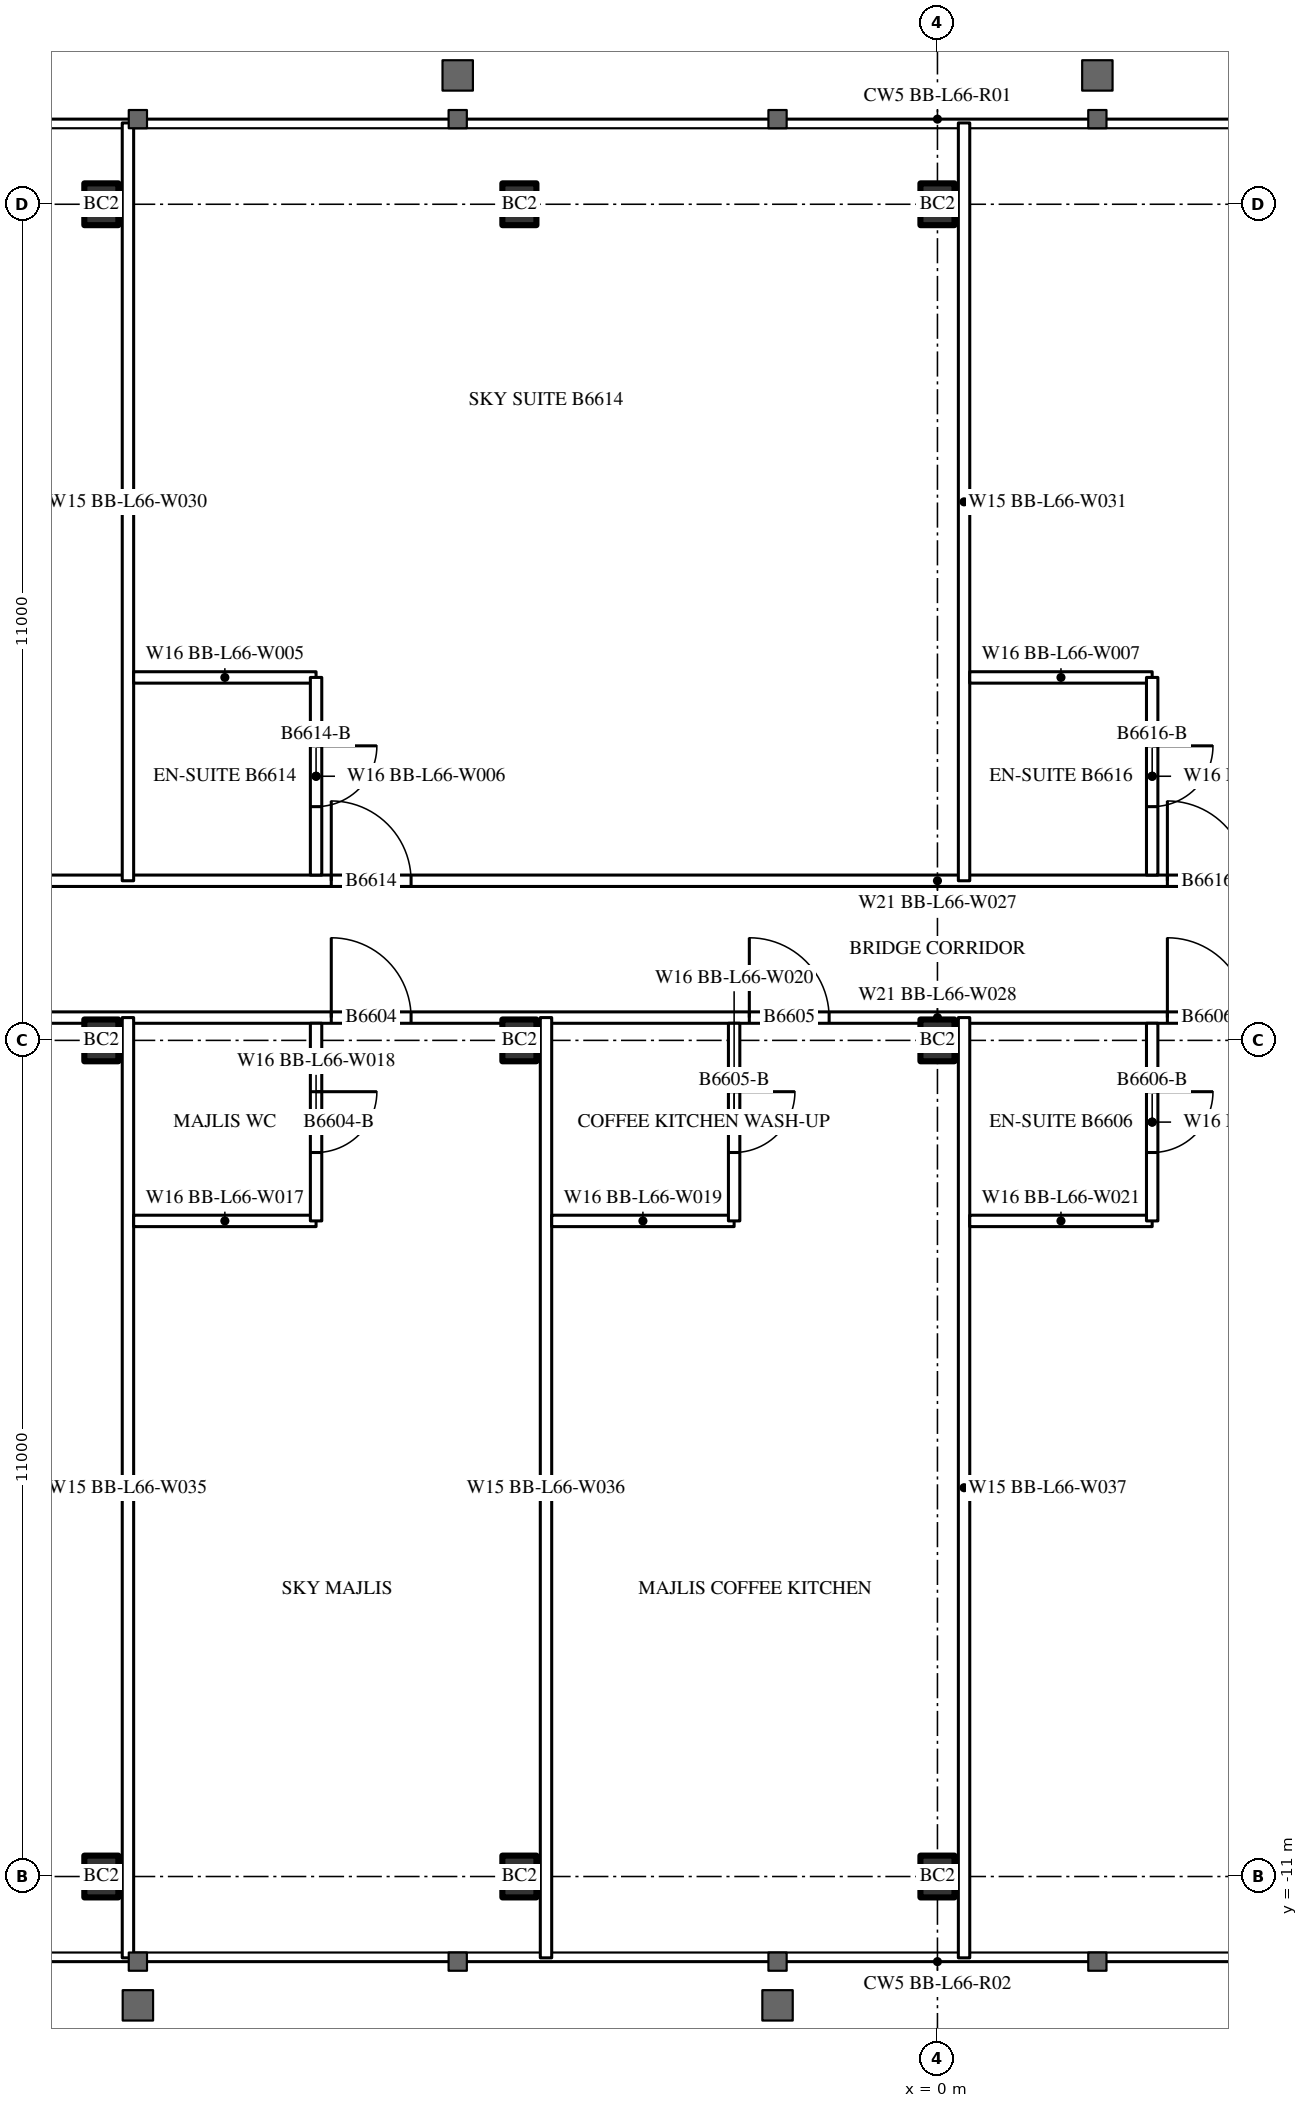
"""IFC4 building model, lengths in metres.
Left out: names, types, materials, properties, quantities, classifications, styles, units other than length and angle.
Written with IfcOpenShell. Run it as: python <this file> out.ifc"""

import sys

from ifc_helpers import new_model, si_unit, direction, frame, frame_2d, origin, origin_2d, place, context, subcontext, project, spatial, rectangle, i_section, extrude, element, fill, save


model = new_model("IFC4")
c1 = context("Model", 3, precision=1e-05, world=origin(), true_north=direction((0.0, 1.0)))
c2 = subcontext(c1, "Body", "Model", "MODEL_VIEW")
j1 = project(units=[si_unit("LENGTHUNIT", "METRE"), si_unit("PLANEANGLEUNIT", "RADIAN")], contexts=[c1])
p1 = place(None, origin())
s1 = spatial("IfcSite", under=j1, at=p1, CompositionType="ELEMENT")
p2 = place(p1, origin())
s2 = spatial("IfcBuilding", under=s1, at=p2, CompositionType="ELEMENT")
p3 = place(p2, frame((0.0, 0.0, 247.7)))
s3 = spatial("IfcBuildingStorey", under=s2, at=p3, CompositionType="ELEMENT", Elevation=247.7)
for number, where, z_axis, x_axis in (
    (1, (-11.0, -11.0, 0.0), (0.0, 0.0, 1.0), (1.0, 0.0, 0.0)),
    (2, (-5.5, -11.0, 0.0), (0.0, 0.0, 1.0), (1.0, 0.0, 0.0)),
    (3, (0.0, -11.0, 0.0), (0.0, 0.0, 1.0), (1.0, 0.0, 0.0)),
    (4, (-11.0, 0.0, 0.0), (0.0, 0.0, 1.0), (1.0, 0.0, 0.0)),
    (5, (-5.5, 0.0, 0.0), (0.0, 0.0, 1.0), (1.0, 0.0, 0.0)),
    (6, (0.0, 0.0, 0.0), (0.0, 0.0, 1.0), (1.0, 0.0, 0.0)),
    (7, (-11.0, 11.0, 0.0), (0.0, 0.0, 1.0), (1.0, 0.0, 0.0)),
    (8, (-5.5, 11.0, 0.0), (0.0, 0.0, 1.0), (1.0, 0.0, 0.0)),
    (9, (0.0, 11.0, 0.0), (0.0, 0.0, 1.0), (1.0, 0.0, 0.0)),
):
    element("IfcColumn", number, at=place(p3, frame(where, z_axis=z_axis, x_axis=x_axis)), inside=s3, PredefinedType="COLUMN", context=c2, shape_type="SweptSolid", body=[
        extrude(i_section(OverallWidth=0.448, OverallDepth=0.55, WebThickness=0.072, FlangeThickness=0.115, FilletRadius=0.02, at=origin_2d()), origin(), (0.0, 0.0, 1.0), 4.2),
    ])
p4 = place(p3, frame((-27.5, 0.3, 0.0), z_axis=(0.0, 0.0, 1.0), x_axis=(1.0, 0.0, 0.0)))
e10 = element("IfcWall", 10, at=p4, inside=s3, PredefinedType="PARTITIONING", context=c2, shape_type="SweptSolid", body=[
    extrude(rectangle(XDim=55.0, YDim=0.15, at=frame_2d((27.5, 0.0))), origin(), (0.0, 0.0, 1.0), 3.0),
])
p5 = place(p4, frame((1.575, 0.0, 0.0)))
e11 = element("IfcOpeningElement", 11, at=p5, cuts=e10, PredefinedType="OPENING", context=c2, shape_type="SweptSolid", body=[
    extrude(rectangle(XDim=1.0, YDim=2.2, at=frame_2d((0.5, 1.1))), frame((0.0, 0.085, 0.0), z_axis=(0.0, -1.0, 0.0), x_axis=(1.0, 0.0, 0.0)), (0.0, 0.0, 1.0), 0.17),
])
p6 = place(p4, frame((8.525, 0.0, 0.0)))
e12 = element("IfcOpeningElement", 12, at=p6, cuts=e10, PredefinedType="OPENING", context=c2, shape_type="SweptSolid", body=[
    extrude(rectangle(XDim=1.05, YDim=2.4, at=frame_2d((0.525, 1.2))), frame((0.0, 0.085, 0.0), z_axis=(0.0, -1.0, 0.0), x_axis=(1.0, 0.0, 0.0)), (0.0, 0.0, 1.0), 0.17),
])
p7 = place(p4, frame((19.525, 0.0, 0.0)))
e13 = element("IfcOpeningElement", 13, at=p7, cuts=e10, PredefinedType="OPENING", context=c2, shape_type="SweptSolid", body=[
    extrude(rectangle(XDim=1.05, YDim=2.4, at=frame_2d((0.525, 1.2))), frame((0.0, 0.085, 0.0), z_axis=(0.0, -1.0, 0.0), x_axis=(1.0, 0.0, 0.0)), (0.0, 0.0, 1.0), 0.17),
])
p8 = place(p4, frame((25.025, 0.0, 0.0)))
e14 = element("IfcOpeningElement", 14, at=p8, cuts=e10, PredefinedType="OPENING", context=c2, shape_type="SweptSolid", body=[
    extrude(rectangle(XDim=1.05, YDim=2.4, at=frame_2d((0.525, 1.2))), frame((0.0, 0.085, 0.0), z_axis=(0.0, -1.0, 0.0), x_axis=(1.0, 0.0, 0.0)), (0.0, 0.0, 1.0), 0.17),
])
p9 = place(p4, frame((30.525, 0.0, 0.0)))
e15 = element("IfcOpeningElement", 15, at=p9, cuts=e10, PredefinedType="OPENING", context=c2, shape_type="SweptSolid", body=[
    extrude(rectangle(XDim=1.05, YDim=2.4, at=frame_2d((0.525, 1.2))), frame((0.0, 0.085, 0.0), z_axis=(0.0, -1.0, 0.0), x_axis=(1.0, 0.0, 0.0)), (0.0, 0.0, 1.0), 0.17),
])
p10 = place(p4, frame((41.525, 0.0, 0.0)))
e16 = element("IfcOpeningElement", 16, at=p10, cuts=e10, PredefinedType="OPENING", context=c2, shape_type="SweptSolid", body=[
    extrude(rectangle(XDim=1.05, YDim=2.4, at=frame_2d((0.525, 1.2))), frame((0.0, 0.085, 0.0), z_axis=(0.0, -1.0, 0.0), x_axis=(1.0, 0.0, 0.0)), (0.0, 0.0, 1.0), 0.17),
])
p11 = place(p4, frame((52.525, 0.0, 0.0)))
e17 = element("IfcOpeningElement", 17, at=p11, cuts=e10, PredefinedType="OPENING", context=c2, shape_type="SweptSolid", body=[
    extrude(rectangle(XDim=1.05, YDim=2.4, at=frame_2d((0.525, 1.2))), frame((0.0, 0.085, 0.0), z_axis=(0.0, -1.0, 0.0), x_axis=(1.0, 0.0, 0.0)), (0.0, 0.0, 1.0), 0.17),
])
p12 = place(p3, frame((-27.5, 2.1, 0.0), z_axis=(0.0, 0.0, 1.0), x_axis=(1.0, 0.0, 0.0)))
e18 = element("IfcWall", 18, at=p12, inside=s3, PredefinedType="PARTITIONING", context=c2, shape_type="SweptSolid", body=[
    extrude(rectangle(XDim=55.0, YDim=0.15, at=frame_2d((27.5, 0.0))), origin(), (0.0, 0.0, 1.0), 4.0),
])
p13 = place(p12, frame((2.025, 0.0, 0.0)))
e19 = element("IfcOpeningElement", 19, at=p13, cuts=e18, PredefinedType="OPENING", context=c2, shape_type="SweptSolid", body=[
    extrude(rectangle(XDim=1.05, YDim=2.4, at=frame_2d((0.525, 1.2))), frame((0.0, 0.085, 0.0), z_axis=(0.0, -1.0, 0.0), x_axis=(1.0, 0.0, 0.0)), (0.0, 0.0, 1.0), 0.17),
])
p14 = place(p12, frame((8.525, 0.0, 0.0)))
e20 = element("IfcOpeningElement", 20, at=p14, cuts=e18, PredefinedType="OPENING", context=c2, shape_type="SweptSolid", body=[
    extrude(rectangle(XDim=1.05, YDim=2.4, at=frame_2d((0.525, 1.2))), frame((0.0, 0.085, 0.0), z_axis=(0.0, -1.0, 0.0), x_axis=(1.0, 0.0, 0.0)), (0.0, 0.0, 1.0), 0.17),
])
p15 = place(p12, frame((19.525, 0.0, 0.0)))
e21 = element("IfcOpeningElement", 21, at=p15, cuts=e18, PredefinedType="OPENING", context=c2, shape_type="SweptSolid", body=[
    extrude(rectangle(XDim=1.05, YDim=2.4, at=frame_2d((0.525, 1.2))), frame((0.0, 0.085, 0.0), z_axis=(0.0, -1.0, 0.0), x_axis=(1.0, 0.0, 0.0)), (0.0, 0.0, 1.0), 0.17),
])
p16 = place(p12, frame((30.525, 0.0, 0.0)))
e22 = element("IfcOpeningElement", 22, at=p16, cuts=e18, PredefinedType="OPENING", context=c2, shape_type="SweptSolid", body=[
    extrude(rectangle(XDim=1.05, YDim=2.4, at=frame_2d((0.525, 1.2))), frame((0.0, 0.085, 0.0), z_axis=(0.0, -1.0, 0.0), x_axis=(1.0, 0.0, 0.0)), (0.0, 0.0, 1.0), 0.17),
])
p17 = place(p12, frame((41.525, 0.0, 0.0)))
e23 = element("IfcOpeningElement", 23, at=p17, cuts=e18, PredefinedType="OPENING", context=c2, shape_type="SweptSolid", body=[
    extrude(rectangle(XDim=1.05, YDim=2.4, at=frame_2d((0.525, 1.2))), frame((0.0, 0.085, 0.0), z_axis=(0.0, -1.0, 0.0), x_axis=(1.0, 0.0, 0.0)), (0.0, 0.0, 1.0), 0.17),
])
p18 = place(p12, frame((52.525, 0.0, 0.0)))
e24 = element("IfcOpeningElement", 24, at=p18, cuts=e18, PredefinedType="OPENING", context=c2, shape_type="SweptSolid", body=[
    extrude(rectangle(XDim=1.05, YDim=2.4, at=frame_2d((0.525, 1.2))), frame((0.0, 0.085, 0.0), z_axis=(0.0, -1.0, 0.0), x_axis=(1.0, 0.0, 0.0)), (0.0, 0.0, 1.0), 0.17),
])
for number, where, z_axis, x_axis in (
    (25, (-10.65, -12.07, 0.0), (0.0, 0.0, 1.0), (0.0, 1.0, 0.0)),
    (26, (-5.15, -12.07, 0.0), (0.0, 0.0, 1.0), (0.0, 1.0, 0.0)),
    (27, (0.35, -12.07, 0.0), (0.0, 0.0, 1.0), (0.0, 1.0, 0.0)),
):
    element("IfcWall", number, at=place(p3, frame(where, z_axis=z_axis, x_axis=x_axis)), inside=s3, PredefinedType="PARTITIONING", context=c2, shape_type="SweptSolid", body=[
        extrude(rectangle(XDim=12.37, YDim=0.15, at=frame_2d((6.185, 0.0))), origin(), (0.0, 0.0, 1.0), 4.0),
    ])
p19 = place(p3, frame((-10.575, -2.375, 0.0), z_axis=(0.0, 0.0, 1.0), x_axis=(1.0, 0.0, 0.0)))
e28 = element("IfcWall", 28, at=p19, inside=s3, PredefinedType="PARTITIONING", context=c2, shape_type="SweptSolid", body=[
    extrude(rectangle(XDim=2.4, YDim=0.15, at=frame_2d((1.2, 0.0))), origin(), (0.0, 0.0, 1.0), 4.0),
])
p20 = place(p3, frame((-8.175, -2.375, 0.0), z_axis=(0.0, 0.0, 1.0), x_axis=(0.0, 1.0, 0.0)))
e29 = element("IfcWall", 29, at=p20, inside=s3, PredefinedType="PARTITIONING", context=c2, shape_type="SweptSolid", body=[
    extrude(rectangle(XDim=2.6, YDim=0.15, at=frame_2d((1.3, 0.0))), origin(), (0.0, 0.0, 1.0), 4.0),
])
p21 = place(p20, frame((0.9, 0.0, 0.0)))
e30 = element("IfcOpeningElement", 30, at=p21, cuts=e29, PredefinedType="OPENING", context=c2, shape_type="SweptSolid", body=[
    extrude(rectangle(XDim=0.8, YDim=2.2, at=frame_2d((0.4, 1.1))), frame((0.0, 0.085, 0.0), z_axis=(0.0, -1.0, 0.0), x_axis=(1.0, 0.0, 0.0)), (0.0, 0.0, 1.0), 0.17),
])
p22 = place(p3, frame((-5.075, -2.375, 0.0), z_axis=(0.0, 0.0, 1.0), x_axis=(1.0, 0.0, 0.0)))
e31 = element("IfcWall", 31, at=p22, inside=s3, PredefinedType="PARTITIONING", context=c2, shape_type="SweptSolid", body=[
    extrude(rectangle(XDim=2.4, YDim=0.15, at=frame_2d((1.2, 0.0))), origin(), (0.0, 0.0, 1.0), 4.0),
])
p23 = place(p3, frame((-2.675, -2.375, 0.0), z_axis=(0.0, 0.0, 1.0), x_axis=(0.0, 1.0, 0.0)))
e32 = element("IfcWall", 32, at=p23, inside=s3, PredefinedType="PARTITIONING", context=c2, shape_type="SweptSolid", body=[
    extrude(rectangle(XDim=2.6, YDim=0.15, at=frame_2d((1.3, 0.0))), origin(), (0.0, 0.0, 1.0), 4.0),
])
p24 = place(p23, frame((0.9, 0.0, 0.0)))
e33 = element("IfcOpeningElement", 33, at=p24, cuts=e32, PredefinedType="OPENING", context=c2, shape_type="SweptSolid", body=[
    extrude(rectangle(XDim=0.8, YDim=2.2, at=frame_2d((0.4, 1.1))), frame((0.0, 0.085, 0.0), z_axis=(0.0, -1.0, 0.0), x_axis=(1.0, 0.0, 0.0)), (0.0, 0.0, 1.0), 0.17),
])
p25 = place(p3, frame((0.425, -2.375, 0.0), z_axis=(0.0, 0.0, 1.0), x_axis=(1.0, 0.0, 0.0)))
e34 = element("IfcWall", 34, at=p25, inside=s3, PredefinedType="PARTITIONING", context=c2, shape_type="SweptSolid", body=[
    extrude(rectangle(XDim=2.4, YDim=0.15, at=frame_2d((1.2, 0.0))), origin(), (0.0, 0.0, 1.0), 4.0),
])
p26 = place(p3, frame((2.825, -2.375, 0.0), z_axis=(0.0, 0.0, 1.0), x_axis=(0.0, 1.0, 0.0)))
e35 = element("IfcWall", 35, at=p26, inside=s3, PredefinedType="PARTITIONING", context=c2, shape_type="SweptSolid", body=[
    extrude(rectangle(XDim=2.6, YDim=0.15, at=frame_2d((1.3, 0.0))), origin(), (0.0, 0.0, 1.0), 4.0),
])
p27 = place(p26, frame((0.9, 0.0, 0.0)))
e36 = element("IfcOpeningElement", 36, at=p27, cuts=e35, PredefinedType="OPENING", context=c2, shape_type="SweptSolid", body=[
    extrude(rectangle(XDim=0.8, YDim=2.2, at=frame_2d((0.4, 1.1))), frame((0.0, 0.085, 0.0), z_axis=(0.0, -1.0, 0.0), x_axis=(1.0, 0.0, 0.0)), (0.0, 0.0, 1.0), 0.17),
])
for number, where, z_axis, x_axis in (
    (37, (-10.65, 2.1, 0.0), (0.0, 0.0, 1.0), (0.0, 1.0, 0.0)),
    (38, (0.35, 2.1, 0.0), (0.0, 0.0, 1.0), (0.0, 1.0, 0.0)),
):
    element("IfcWall", number, at=place(p3, frame(where, z_axis=z_axis, x_axis=x_axis)), inside=s3, PredefinedType="PARTITIONING", context=c2, shape_type="SweptSolid", body=[
        extrude(rectangle(XDim=9.97, YDim=0.15, at=frame_2d((4.985, 0.0))), origin(), (0.0, 0.0, 1.0), 4.0),
    ])
p28 = place(p3, frame((-10.575, 4.775, 0.0), z_axis=(0.0, 0.0, 1.0), x_axis=(1.0, 0.0, 0.0)))
e39 = element("IfcWall", 39, at=p28, inside=s3, PredefinedType="PARTITIONING", context=c2, shape_type="SweptSolid", body=[
    extrude(rectangle(XDim=2.4, YDim=0.15, at=frame_2d((1.2, 0.0))), origin(), (0.0, 0.0, 1.0), 4.0),
])
p29 = place(p3, frame((-8.175, 2.175, 0.0), z_axis=(0.0, 0.0, 1.0), x_axis=(0.0, 1.0, 0.0)))
e40 = element("IfcWall", 40, at=p29, inside=s3, PredefinedType="PARTITIONING", context=c2, shape_type="SweptSolid", body=[
    extrude(rectangle(XDim=2.6, YDim=0.15, at=frame_2d((1.3, 0.0))), origin(), (0.0, 0.0, 1.0), 4.0),
])
p30 = place(p29, frame((0.9, 0.0, 0.0)))
e41 = element("IfcOpeningElement", 41, at=p30, cuts=e40, PredefinedType="OPENING", context=c2, shape_type="SweptSolid", body=[
    extrude(rectangle(XDim=0.8, YDim=2.2, at=frame_2d((0.4, 1.1))), frame((0.0, 0.085, 0.0), z_axis=(0.0, -1.0, 0.0), x_axis=(1.0, 0.0, 0.0)), (0.0, 0.0, 1.0), 0.17),
])
p31 = place(p3, frame((0.425, 4.775, 0.0), z_axis=(0.0, 0.0, 1.0), x_axis=(1.0, 0.0, 0.0)))
e42 = element("IfcWall", 42, at=p31, inside=s3, PredefinedType="PARTITIONING", context=c2, shape_type="SweptSolid", body=[
    extrude(rectangle(XDim=2.4, YDim=0.15, at=frame_2d((1.2, 0.0))), origin(), (0.0, 0.0, 1.0), 4.0),
])
p32 = place(p3, frame((2.825, 2.175, 0.0), z_axis=(0.0, 0.0, 1.0), x_axis=(0.0, 1.0, 0.0)))
e43 = element("IfcWall", 43, at=p32, inside=s3, PredefinedType="PARTITIONING", context=c2, shape_type="SweptSolid", body=[
    extrude(rectangle(XDim=2.6, YDim=0.15, at=frame_2d((1.3, 0.0))), origin(), (0.0, 0.0, 1.0), 4.0),
])
p33 = place(p32, frame((0.9, 0.0, 0.0)))
e44 = element("IfcOpeningElement", 44, at=p33, cuts=e43, PredefinedType="OPENING", context=c2, shape_type="SweptSolid", body=[
    extrude(rectangle(XDim=0.8, YDim=2.2, at=frame_2d((0.4, 1.1))), frame((0.0, 0.085, 0.0), z_axis=(0.0, -1.0, 0.0), x_axis=(1.0, 0.0, 0.0)), (0.0, 0.0, 1.0), 0.17),
])
p34 = place(p21, origin())
e45 = element("IfcDoor", 45, at=p34, inside=s3, OperationType="SINGLE_SWING_RIGHT", PredefinedType="DOOR", context=c2, shape_type="SweptSolid", body=[
    extrude(rectangle(XDim=0.8, YDim=2.2, at=frame_2d((0.4, 1.1))), frame((0.0, 0.025, 0.0), z_axis=(0.0, -1.0, 0.0), x_axis=(1.0, 0.0, 0.0)), (0.0, 0.0, 1.0), 0.05),
])
fill(e30, e45)
p35 = place(p7, origin())
e46 = element("IfcDoor", 46, at=p35, inside=s3, OperationType="SINGLE_SWING_LEFT", PredefinedType="DOOR", context=c2, shape_type="SweptSolid", body=[
    extrude(rectangle(XDim=1.05, YDim=2.4, at=frame_2d((0.525, 1.2))), frame((0.0, 0.025, 0.0), z_axis=(0.0, -1.0, 0.0), x_axis=(1.0, 0.0, 0.0)), (0.0, 0.0, 1.0), 0.05),
])
fill(e13, e46)
p36 = place(p24, origin())
e47 = element("IfcDoor", 47, at=p36, inside=s3, OperationType="SINGLE_SWING_RIGHT", PredefinedType="DOOR", context=c2, shape_type="SweptSolid", body=[
    extrude(rectangle(XDim=0.8, YDim=2.2, at=frame_2d((0.4, 1.1))), frame((0.0, 0.025, 0.0), z_axis=(0.0, -1.0, 0.0), x_axis=(1.0, 0.0, 0.0)), (0.0, 0.0, 1.0), 0.05),
])
fill(e33, e47)
p37 = place(p8, origin())
e48 = element("IfcDoor", 48, at=p37, inside=s3, OperationType="SINGLE_SWING_LEFT", PredefinedType="DOOR", context=c2, shape_type="SweptSolid", body=[
    extrude(rectangle(XDim=1.05, YDim=2.4, at=frame_2d((0.525, 1.2))), frame((0.0, 0.025, 0.0), z_axis=(0.0, -1.0, 0.0), x_axis=(1.0, 0.0, 0.0)), (0.0, 0.0, 1.0), 0.05),
])
fill(e14, e48)
p38 = place(p27, origin())
e49 = element("IfcDoor", 49, at=p38, inside=s3, OperationType="SINGLE_SWING_RIGHT", PredefinedType="DOOR", context=c2, shape_type="SweptSolid", body=[
    extrude(rectangle(XDim=0.8, YDim=2.2, at=frame_2d((0.4, 1.1))), frame((0.0, 0.025, 0.0), z_axis=(0.0, -1.0, 0.0), x_axis=(1.0, 0.0, 0.0)), (0.0, 0.0, 1.0), 0.05),
])
fill(e36, e49)
p39 = place(p9, origin())
e50 = element("IfcDoor", 50, at=p39, inside=s3, OperationType="SINGLE_SWING_LEFT", PredefinedType="DOOR", context=c2, shape_type="SweptSolid", body=[
    extrude(rectangle(XDim=1.05, YDim=2.4, at=frame_2d((0.525, 1.2))), frame((0.0, 0.025, 0.0), z_axis=(0.0, -1.0, 0.0), x_axis=(1.0, 0.0, 0.0)), (0.0, 0.0, 1.0), 0.05),
])
fill(e15, e50)
p40 = place(p30, origin())
e51 = element("IfcDoor", 51, at=p40, inside=s3, OperationType="SINGLE_SWING_RIGHT", PredefinedType="DOOR", context=c2, shape_type="SweptSolid", body=[
    extrude(rectangle(XDim=0.8, YDim=2.2, at=frame_2d((0.4, 1.1))), frame((0.0, 0.025, 0.0), z_axis=(0.0, -1.0, 0.0), x_axis=(1.0, 0.0, 0.0)), (0.0, 0.0, 1.0), 0.05),
])
fill(e41, e51)
p41 = place(p15, origin())
e52 = element("IfcDoor", 52, at=p41, inside=s3, OperationType="SINGLE_SWING_LEFT", PredefinedType="DOOR", context=c2, shape_type="SweptSolid", body=[
    extrude(rectangle(XDim=1.05, YDim=2.4, at=frame_2d((0.525, 1.2))), frame((0.0, 0.025, 0.0), z_axis=(0.0, -1.0, 0.0), x_axis=(1.0, 0.0, 0.0)), (0.0, 0.0, 1.0), 0.05),
])
fill(e21, e52)
p42 = place(p33, origin())
e53 = element("IfcDoor", 53, at=p42, inside=s3, OperationType="SINGLE_SWING_RIGHT", PredefinedType="DOOR", context=c2, shape_type="SweptSolid", body=[
    extrude(rectangle(XDim=0.8, YDim=2.2, at=frame_2d((0.4, 1.1))), frame((0.0, 0.025, 0.0), z_axis=(0.0, -1.0, 0.0), x_axis=(1.0, 0.0, 0.0)), (0.0, 0.0, 1.0), 0.05),
])
fill(e44, e53)
p43 = place(p16, origin())
e54 = element("IfcDoor", 54, at=p43, inside=s3, OperationType="SINGLE_SWING_LEFT", PredefinedType="DOOR", context=c2, shape_type="SweptSolid", body=[
    extrude(rectangle(XDim=1.05, YDim=2.4, at=frame_2d((0.525, 1.2))), frame((0.0, 0.025, 0.0), z_axis=(0.0, -1.0, 0.0), x_axis=(1.0, 0.0, 0.0)), (0.0, 0.0, 1.0), 0.05),
])
fill(e22, e54)
save(model, sys.argv[1])
